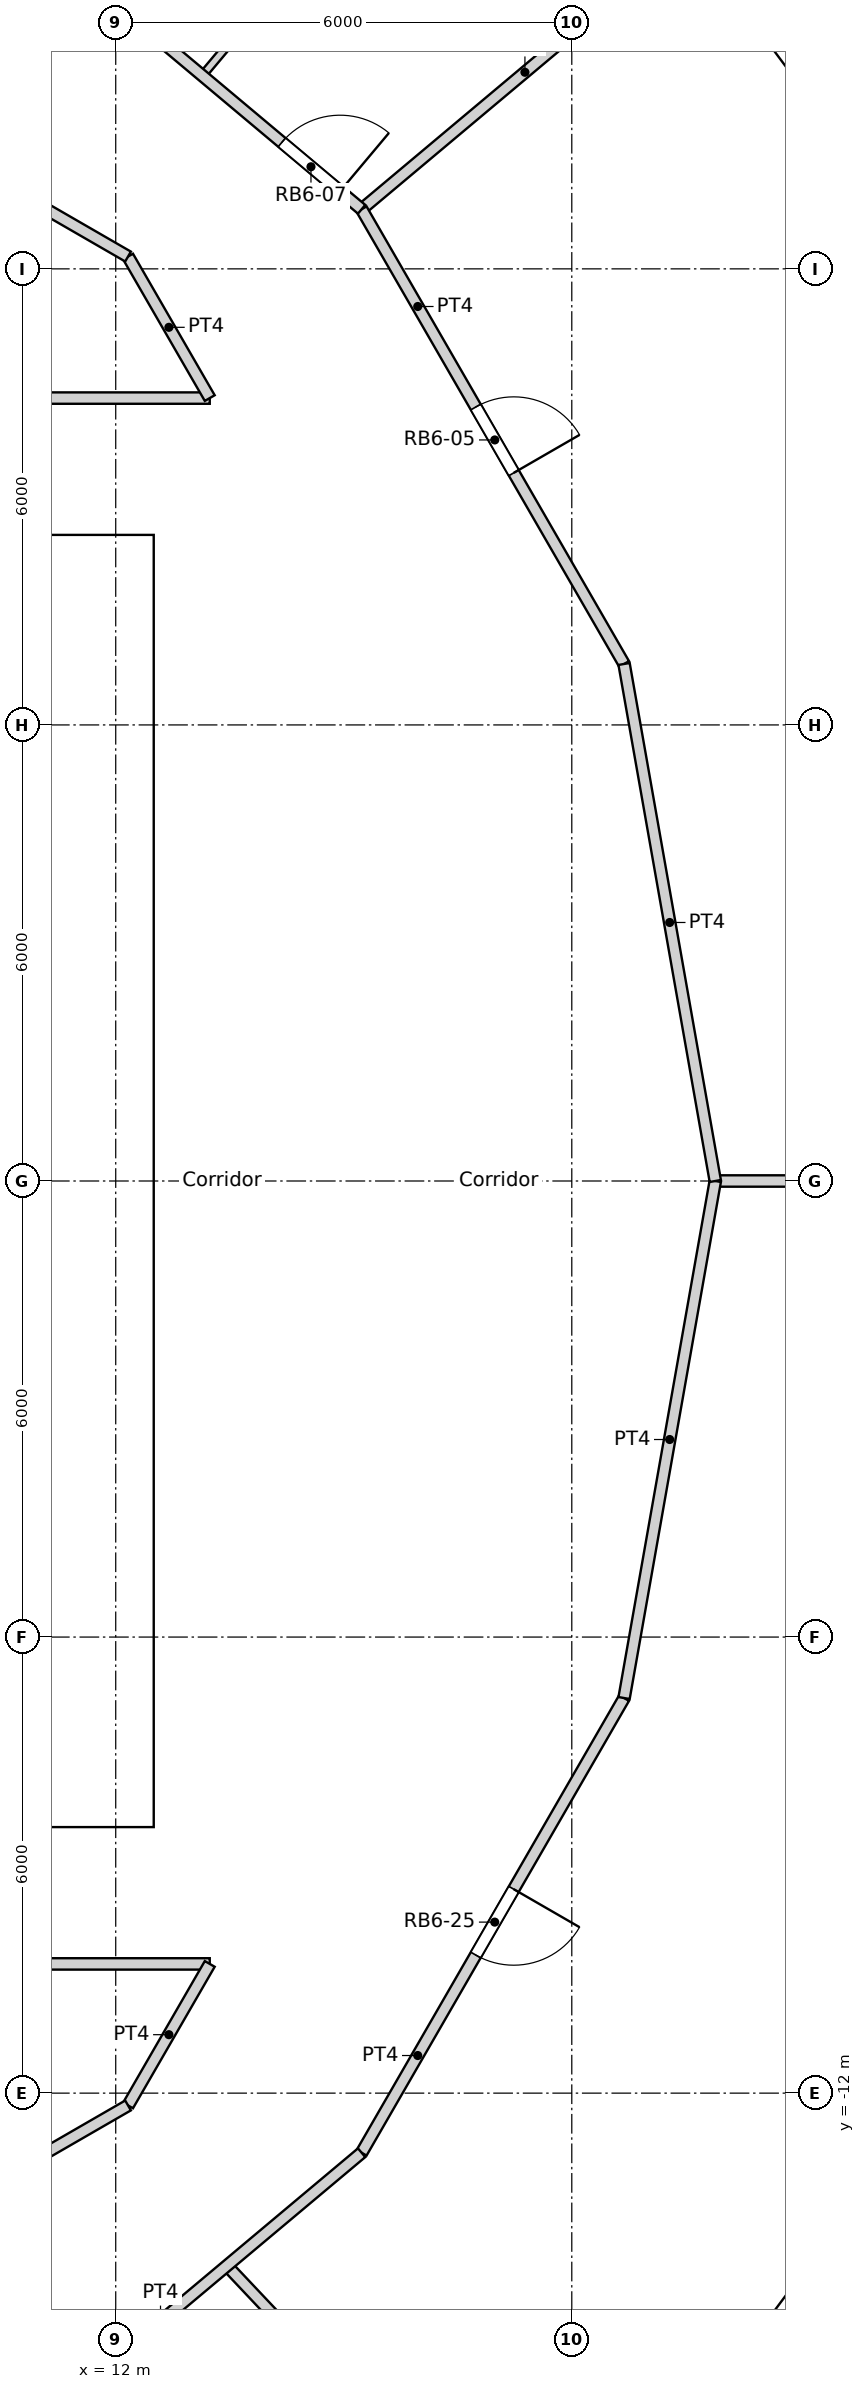
"""IFC4 building model, lengths in metres.
Left out: names, types, materials, properties, quantities, classifications, styles, units other than length and angle.
Written with IfcOpenShell. Run it as: python <this file> out.ifc"""

import sys

from ifc_helpers import new_model, si_unit, direction, frame, frame_2d, origin, origin_2d, place, context, subcontext, project, spatial, rectangle, circle, extrude, element, fill, save


model = new_model("IFC4")
c1 = context("Model", 3, precision=1e-05, world=origin(), true_north=direction((0.0, 1.0)))
c2 = subcontext(c1, "Body", "Model", "MODEL_VIEW")
j1 = project(units=[si_unit("LENGTHUNIT", "METRE"), si_unit("PLANEANGLEUNIT", "RADIAN")], contexts=[c1])
p1 = place(None, origin())
s1 = spatial("IfcSite", under=j1, at=p1, CompositionType="ELEMENT")
p2 = place(p1, origin())
s2 = spatial("IfcBuilding", under=s1, at=p2, CompositionType="ELEMENT")
p3 = place(p2, frame((0.0, 0.0, 180.0)))
s3 = spatial("IfcBuildingStorey", under=s2, at=p3, CompositionType="ELEMENT", Elevation=180.0)
for number, where, z_axis, x_axis in (
    (1, (18.822, 0.0, 0.0), (0.0, 0.0, 1.0), (1.0, 0.0, 0.0)),
    (2, (17.986, 5.548, 0.0), (0.0, 0.0, 1.0), (1.0, 0.0, 0.0)),
    (3, (15.552, 10.603, 0.0), (0.0, 0.0, 1.0), (1.0, 0.0, 0.0)),
    (4, (11.735, 14.716, 0.0), (0.0, 0.0, 1.0), (1.0, 0.0, 0.0)),
    (5, (11.735, -14.716, 0.0), (0.0, 0.0, 1.0), (1.0, 0.0, 0.0)),
    (6, (15.552, -10.603, 0.0), (0.0, 0.0, 1.0), (1.0, 0.0, 0.0)),
    (7, (17.986, -5.548, 0.0), (0.0, 0.0, 1.0), (1.0, 0.0, 0.0)),
):
    element("IfcColumn", number, at=place(p3, frame(where, z_axis=z_axis, x_axis=x_axis)), inside=s3, PredefinedType="COLUMN", context=c2, shape_type="SweptSolid", body=[
        extrude(circle(Radius=0.65, at=origin_2d()), origin(), (0.0, 0.0, 1.0), 3.6),
    ])
p4 = place(p3, frame((21.895, 14.43, -0.3), z_axis=(0.0, 0.0, 1.0), x_axis=(-0.597183717734, 0.802104486506, 0.0)))
e8 = element("IfcWall", 8, at=p4, inside=s3, PredefinedType="ELEMENTEDWALL", context=c2, shape_type="SweptSolid", body=[
    extrude(rectangle(XDim=3.0, YDim=1.45, at=frame_2d((1.5, 0.0))), origin(), (0.0, 0.0, 1.0), 3.6),
])
p5 = place(p4, frame((1.5, 0.0, 1.85)))
e9 = element("IfcOpeningElement", 9, at=p5, cuts=e8, PredefinedType="OPENING", context=c2, shape_type="SweptSolid", body=[
    extrude(circle(Radius=0.9, at=origin_2d()), frame((0.0, 0.735, 0.0), z_axis=(0.0, -1.0, 0.0), x_axis=(1.0, 0.0, 0.0)), (0.0, 0.0, 1.0), 1.47),
])
p6 = place(p3, frame((19.653, -16.478, 0.0), z_axis=(0.0, 0.0, 1.0), x_axis=(0.597197580538, 0.80209416517, 0.0)))
e10 = element("IfcWall", 10, at=p6, inside=s3, PredefinedType="SOLIDWALL", context=c2, shape_type="SweptSolid", body=[
    extrude(rectangle(XDim=2.973, YDim=0.3, at=frame_2d((1.486, 0.0))), origin(), (0.0, 0.0, 1.0), 3.3),
])
p7 = place(p6, frame((1.486, 0.0, 1.55)))
e11 = element("IfcOpeningElement", 11, at=p7, cuts=e10, PredefinedType="OPENING", context=c2, shape_type="SweptSolid", body=[
    extrude(circle(Radius=0.9, at=origin_2d()), frame((0.0, 0.16, 0.0), z_axis=(0.0, -1.0, 0.0), x_axis=(1.0, 0.0, 0.0)), (0.0, 0.0, 1.0), 0.32),
])
p8 = place(p3, frame((-12.5, -8.05, 0.0), z_axis=(0.0, 0.0, 1.0), x_axis=(1.0, 0.0, 0.0)))
e12 = element("IfcWall", 12, at=p8, inside=s3, PredefinedType="SOLIDWALL", context=c2, shape_type="SweptSolid", body=[
    extrude(rectangle(XDim=25.0, YDim=0.9, at=frame_2d((12.5, 0.0))), origin(), (0.0, 0.0, 1.0), 3.6),
])
p9 = place(p8, frame((13.4, 0.0, 0.0)))
e13 = element("IfcOpeningElement", 13, at=p9, cuts=e12, PredefinedType="OPENING", context=c2, shape_type="SweptSolid", body=[
    extrude(rectangle(XDim=1.0, YDim=2.1, at=frame_2d((0.5, 1.05))), frame((0.0, 0.45, 0.0), z_axis=(0.0, -1.0, 0.0), x_axis=(1.0, 0.0, 0.0)), (0.0, 0.0, 1.0), 0.9),
])
p10 = place(p8, frame((8.3, 0.0, 0.0)))
e14 = element("IfcOpeningElement", 14, at=p10, cuts=e12, PredefinedType="OPENING", context=c2, shape_type="SweptSolid", body=[
    extrude(rectangle(XDim=1.8, YDim=2.1, at=frame_2d((0.9, 1.05))), frame((0.0, 0.45, 0.0), z_axis=(0.0, -1.0, 0.0), x_axis=(1.0, 0.0, 0.0)), (0.0, 0.0, 1.0), 0.9),
])
p11 = place(p8, frame((14.9, 0.0, 0.0)))
e15 = element("IfcOpeningElement", 15, at=p11, cuts=e12, PredefinedType="OPENING", context=c2, shape_type="SweptSolid", body=[
    extrude(rectangle(XDim=1.8, YDim=2.1, at=frame_2d((0.9, 1.05))), frame((0.0, 0.45, 0.0), z_axis=(0.0, -1.0, 0.0), x_axis=(1.0, 0.0, 0.0)), (0.0, 0.0, 1.0), 0.9),
])
p12 = place(p3, frame((-12.5, 8.05, 0.0), z_axis=(0.0, 0.0, 1.0), x_axis=(1.0, 0.0, 0.0)))
e16 = element("IfcWall", 16, at=p12, inside=s3, PredefinedType="SOLIDWALL", context=c2, shape_type="SweptSolid", body=[
    extrude(rectangle(XDim=25.0, YDim=0.9, at=frame_2d((12.5, 0.0))), origin(), (0.0, 0.0, 1.0), 3.6),
])
p13 = place(p12, frame((8.3, 0.0, 0.0)))
e17 = element("IfcOpeningElement", 17, at=p13, cuts=e16, PredefinedType="OPENING", context=c2, shape_type="SweptSolid", body=[
    extrude(rectangle(XDim=1.8, YDim=2.1, at=frame_2d((0.9, 1.05))), frame((0.0, 0.45, 0.0), z_axis=(0.0, -1.0, 0.0), x_axis=(1.0, 0.0, 0.0)), (0.0, 0.0, 1.0), 0.9),
])
p14 = place(p3, frame((12.05, -7.6, 0.0), z_axis=(0.0, 0.0, 1.0), x_axis=(0.0, 1.0, 0.0)))
e18 = element("IfcWall", 18, at=p14, inside=s3, PredefinedType="SOLIDWALL", context=c2, shape_type="SweptSolid", body=[
    extrude(rectangle(XDim=15.2, YDim=0.9, at=frame_2d((7.6, 0.0))), origin(), (0.0, 0.0, 1.0), 3.6),
])
p15 = place(p14, frame((5.1, 0.0, 0.0)))
e19 = element("IfcOpeningElement", 19, at=p15, cuts=e18, PredefinedType="OPENING", context=c2, shape_type="SweptSolid", body=[
    extrude(rectangle(XDim=1.0, YDim=2.1, at=frame_2d((0.5, 1.05))), frame((0.0, 0.45, 0.0), z_axis=(0.0, -1.0, 0.0), x_axis=(1.0, 0.0, 0.0)), (0.0, 0.0, 1.0), 0.9),
])
p16 = place(p3, frame((9.2, -4.55, 0.0), z_axis=(0.0, 0.0, 1.0), x_axis=(1.0, 0.0, 0.0)))
e20 = element("IfcWall", 20, at=p16, inside=s3, PredefinedType="SOLIDWALL", context=c2, shape_type="SweptSolid", body=[
    extrude(rectangle(XDim=2.4, YDim=0.3, at=frame_2d((1.2, 0.0))), origin(), (0.0, 0.0, 1.0), 3.3),
])
p17 = place(p16, frame((0.65, 0.0, 0.0)))
e21 = element("IfcOpeningElement", 21, at=p17, cuts=e20, PredefinedType="OPENING", context=c2, shape_type="SweptSolid", body=[
    extrude(rectangle(XDim=1.1, YDim=2.1, at=frame_2d((0.55, 1.05))), frame((0.0, 0.15, 0.0), z_axis=(0.0, -1.0, 0.0), x_axis=(1.0, 0.0, 0.0)), (0.0, 0.0, 1.0), 0.3),
])
p18 = place(p3, frame((9.2, 4.55, 0.0), z_axis=(0.0, 0.0, 1.0), x_axis=(1.0, 0.0, 0.0)))
e22 = element("IfcWall", 22, at=p18, inside=s3, PredefinedType="SOLIDWALL", context=c2, shape_type="SweptSolid", body=[
    extrude(rectangle(XDim=2.4, YDim=0.3, at=frame_2d((1.2, 0.0))), origin(), (0.0, 0.0, 1.0), 3.3),
])
p19 = place(p18, frame((0.65, 0.0, 0.0)))
e23 = element("IfcOpeningElement", 23, at=p19, cuts=e22, PredefinedType="OPENING", context=c2, shape_type="SweptSolid", body=[
    extrude(rectangle(XDim=1.1, YDim=2.1, at=frame_2d((0.55, 1.05))), frame((0.0, 0.15, 0.0), z_axis=(0.0, -1.0, 0.0), x_axis=(1.0, 0.0, 0.0)), (0.0, 0.0, 1.0), 0.3),
])
p20 = place(p3, frame((-3.025, 10.3, 0.0), z_axis=(0.0, 0.0, 1.0), x_axis=(1.0, 0.0, 0.0)))
e24 = element("IfcWall", 24, at=p20, inside=s3, PredefinedType="PARTITIONING", context=c2, shape_type="SweptSolid", body=[
    extrude(rectangle(XDim=16.262, YDim=0.15, at=frame_2d((8.131, 0.0))), origin(), (0.0, 0.0, 1.0), 3.3),
])
p21 = place(p20, frame((7.263, 0.0, 0.0)))
e25 = element("IfcOpeningElement", 25, at=p21, cuts=e24, PredefinedType="OPENING", context=c2, shape_type="SweptSolid", body=[
    extrude(rectangle(XDim=1.0, YDim=2.04, at=frame_2d((0.5, 1.02))), frame((0.0, 0.075, 0.0), z_axis=(0.0, -1.0, 0.0), x_axis=(1.0, 0.0, 0.0)), (0.0, 0.0, 1.0), 0.15),
])
p22 = place(p3, frame((-3.025, -10.3, 0.0), z_axis=(0.0, 0.0, 1.0), x_axis=(1.0, 0.0, 0.0)))
e26 = element("IfcWall", 26, at=p22, inside=s3, PredefinedType="PARTITIONING", context=c2, shape_type="SweptSolid", body=[
    extrude(rectangle(XDim=16.262, YDim=0.15, at=frame_2d((8.131, 0.0))), origin(), (0.0, 0.0, 1.0), 3.3),
])
p23 = place(p22, frame((7.287, 0.0, 0.0)))
e27 = element("IfcOpeningElement", 27, at=p23, cuts=e26, PredefinedType="OPENING", context=c2, shape_type="SweptSolid", body=[
    extrude(rectangle(XDim=0.95, YDim=2.1, at=frame_2d((0.475, 1.05))), frame((0.0, 0.075, 0.0), z_axis=(0.0, -1.0, 0.0), x_axis=(1.0, 0.0, 0.0)), (0.0, 0.0, 1.0), 0.15),
])
for number, where, z_axis, x_axis in (
    (28, (12.162, 12.162, 0.0), (0.0, 0.0, 1.0), (0.5, -0.866, 0.0)),
    (29, (12.162, -12.162, 0.0), (0.0, 0.0, 1.0), (0.5, 0.866, 0.0)),
):
    element("IfcWall", number, at=place(p3, frame(where, z_axis=z_axis, x_axis=x_axis)), inside=s3, PredefinedType="PARTITIONING", context=c2, shape_type="SweptSolid", body=[
        extrude(rectangle(XDim=2.15, YDim=0.15, at=frame_2d((1.075, 0.0))), origin(), (0.0, 0.0, 1.0), 3.3),
    ])
p24 = place(p3, frame((15.235, 12.784, 0.0), z_axis=(0.0, 0.0, 1.0), x_axis=(0.499914202267, -0.866074933462, 0.0)))
e30 = element("IfcWall", 30, at=p24, inside=s3, PredefinedType="PARTITIONING", context=c2, shape_type="SweptSolid", body=[
    extrude(rectangle(XDim=6.907, YDim=0.15, at=frame_2d((3.454, 0.0))), origin(), (0.0, 0.0, 1.0), 3.3),
])
p25 = place(p24, frame((3.004, 0.0, 0.0)))
e31 = element("IfcOpeningElement", 31, at=p25, cuts=e30, PredefinedType="OPENING", context=c2, shape_type="SweptSolid", body=[
    extrude(rectangle(XDim=1.0, YDim=2.04, at=frame_2d((0.5, 1.02))), frame((0.0, 0.075, 0.0), z_axis=(0.0, -1.0, 0.0), x_axis=(1.0, 0.0, 0.0)), (0.0, 0.0, 1.0), 0.15),
])
p26 = place(p3, frame((18.688, 6.802, 0.0), z_axis=(0.0, 0.0, 1.0), x_axis=(0.173728873845, -0.98479352069, 0.0)))
e32 = element("IfcWall", 32, at=p26, inside=s3, PredefinedType="PARTITIONING", context=c2, shape_type="SweptSolid", body=[
    extrude(rectangle(XDim=6.907, YDim=0.15, at=frame_2d((3.454, 0.0))), origin(), (0.0, 0.0, 1.0), 3.3),
])
p27 = place(p3, frame((9.943, 17.222, 0.0), z_axis=(0.0, 0.0, 1.0), x_axis=(0.766192104565, -0.642611592567, 0.0)))
e33 = element("IfcWall", 33, at=p27, inside=s3, PredefinedType="PARTITIONING", context=c2, shape_type="SweptSolid", body=[
    extrude(rectangle(XDim=6.906, YDim=0.15, at=frame_2d((3.453, 0.0))), origin(), (0.0, 0.0, 1.0), 3.3),
])
p28 = place(p27, frame((5.537, 0.0, 0.0)))
e34 = element("IfcOpeningElement", 34, at=p28, cuts=e33, PredefinedType="OPENING", context=c2, shape_type="SweptSolid", body=[
    extrude(rectangle(XDim=1.0, YDim=2.1, at=frame_2d((0.5, 1.05))), frame((0.0, 0.075, 0.0), z_axis=(0.0, -1.0, 0.0), x_axis=(1.0, 0.0, 0.0)), (0.0, 0.0, 1.0), 0.15),
])
p29 = place(p3, frame((18.688, -6.802, 0.0), z_axis=(0.0, 0.0, 1.0), x_axis=(0.173728873845, 0.98479352069, 0.0)))
e35 = element("IfcWall", 35, at=p29, inside=s3, PredefinedType="PARTITIONING", context=c2, shape_type="SweptSolid", body=[
    extrude(rectangle(XDim=6.907, YDim=0.15, at=frame_2d((3.454, 0.0))), origin(), (0.0, 0.0, 1.0), 3.3),
])
p30 = place(p3, frame((15.235, -12.784, 0.0), z_axis=(0.0, 0.0, 1.0), x_axis=(0.499914202267, 0.866074933462, 0.0)))
e36 = element("IfcWall", 36, at=p30, inside=s3, PredefinedType="PARTITIONING", context=c2, shape_type="SweptSolid", body=[
    extrude(rectangle(XDim=6.907, YDim=0.15, at=frame_2d((3.454, 0.0))), origin(), (0.0, 0.0, 1.0), 3.3),
])
p31 = place(p30, frame((3.003, 0.0, 0.0)))
e37 = element("IfcOpeningElement", 37, at=p31, cuts=e36, PredefinedType="OPENING", context=c2, shape_type="SweptSolid", body=[
    extrude(rectangle(XDim=1.0, YDim=2.04, at=frame_2d((0.5, 1.02))), frame((0.0, 0.075, 0.0), z_axis=(0.0, -1.0, 0.0), x_axis=(1.0, 0.0, 0.0)), (0.0, 0.0, 1.0), 0.15),
])
p32 = place(p3, frame((9.943, -17.222, 0.0), z_axis=(0.0, 0.0, 1.0), x_axis=(0.766192104565, 0.642611592567, 0.0)))
e38 = element("IfcWall", 38, at=p32, inside=s3, PredefinedType="PARTITIONING", context=c2, shape_type="SweptSolid", body=[
    extrude(rectangle(XDim=6.906, YDim=0.15, at=frame_2d((3.453, 0.0))), origin(), (0.0, 0.0, 1.0), 3.3),
])
for number, where, z_axis, x_axis in (
    (39, (4.452, 16.614, 0.0), (0.0, 0.0, 1.0), (0.866, -0.5, 0.0)),
    (40, (4.452, -16.614, 0.0), (0.0, 0.0, 1.0), (0.866, 0.5, 0.0)),
):
    element("IfcWall", number, at=place(p3, frame(where, z_axis=z_axis, x_axis=x_axis)), inside=s3, PredefinedType="PARTITIONING", context=c2, shape_type="SweptSolid", body=[
        extrude(rectangle(XDim=8.903, YDim=0.15, at=frame_2d((4.452, 0.0))), origin(), (0.0, 0.0, 1.0), 3.3),
    ])
p33 = place(p3, frame((15.235, 12.784, 0.0), z_axis=(0.0, 0.0, 1.0), x_axis=(0.76609059793, 0.642732600514, 0.0)))
e41 = element("IfcWall", 41, at=p33, inside=s3, PredefinedType="PARTITIONING", context=c2, shape_type="SweptSolid", body=[
    extrude(rectangle(XDim=5.609, YDim=0.15, at=frame_2d((2.804, 0.0))), origin(), (0.0, 0.0, 1.0), 3.3),
])
p34 = place(p3, frame((19.888, 0.0, 0.0), z_axis=(0.0, 0.0, 1.0), x_axis=(1.0, 0.0, 0.0)))
e42 = element("IfcWall", 42, at=p34, inside=s3, PredefinedType="PARTITIONING", context=c2, shape_type="SweptSolid", body=[
    extrude(rectangle(XDim=5.609, YDim=0.15, at=frame_2d((2.805, 0.0))), origin(), (0.0, 0.0, 1.0), 3.3),
])
p35 = place(p3, frame((13.139, 14.542, 0.0), z_axis=(0.0, 0.0, 1.0), x_axis=(0.642731657745, 0.766091388891, 0.0)))
e43 = element("IfcWall", 43, at=p35, inside=s3, PredefinedType="PARTITIONING", context=c2, shape_type="SweptSolid", body=[
    extrude(rectangle(XDim=2.401, YDim=0.1, at=frame_2d((1.2, 0.0))), origin(), (0.0, 0.0, 1.0), 3.3),
])
p36 = place(p35, frame((0.75, 0.0, 0.0)))
e44 = element("IfcOpeningElement", 44, at=p36, cuts=e43, PredefinedType="OPENING", context=c2, shape_type="SweptSolid", body=[
    extrude(rectangle(XDim=0.9, YDim=2.04, at=frame_2d((0.45, 1.02))), frame((0.0, 0.05, 0.0), z_axis=(0.0, -1.0, 0.0), x_axis=(1.0, 0.0, 0.0)), (0.0, 0.0, 1.0), 0.1),
])
p37 = place(p3, frame((13.463, -14.27, 0.0), z_axis=(0.0, 0.0, 1.0), x_axis=(0.6862502776, -0.72736549031, 0.0)))
e45 = element("IfcWall", 45, at=p37, inside=s3, PredefinedType="PARTITIONING", context=c2, shape_type="SweptSolid", body=[
    extrude(rectangle(XDim=5.879, YDim=0.15, at=frame_2d((2.939, 0.0))), origin(), (0.0, 0.0, 1.0), 3.3),
])
p38 = place(p5, origin())
e46 = element("IfcWindow", 46, at=p38, inside=s3, PartitioningType="SINGLE_PANEL", PredefinedType="WINDOW", context=c2, shape_type="SweptSolid", body=[
    extrude(circle(Radius=0.9, at=origin_2d()), frame((0.0, 0.695, 0.0), z_axis=(0.0, -1.0, 0.0), x_axis=(1.0, 0.0, 0.0)), (0.0, 0.0, 1.0), 0.1),
])
fill(e9, e46)
p39 = place(p7, origin())
e47 = element("IfcWindow", 47, at=p39, inside=s3, PartitioningType="SINGLE_PANEL", PredefinedType="WINDOW", context=c2, shape_type="SweptSolid", body=[
    extrude(circle(Radius=0.9, at=origin_2d()), frame((0.0, 0.12, 0.0), z_axis=(0.0, -1.0, 0.0), x_axis=(1.0, 0.0, 0.0)), (0.0, 0.0, 1.0), 0.1),
])
fill(e11, e47)
p40 = place(p15, origin())
e48 = element("IfcDoor", 48, at=p40, inside=s3, OperationType="DOUBLE_DOOR_SINGLE_SWING", PredefinedType="DOOR", context=c2, shape_type="SweptSolid", body=[
    extrude(rectangle(XDim=1.0, YDim=2.1, at=frame_2d((0.5, 1.05))), frame((0.0, 0.025, 0.0), z_axis=(0.0, -1.0, 0.0), x_axis=(1.0, 0.0, 0.0)), (0.0, 0.0, 1.0), 0.05),
])
fill(e19, e48)
p41 = place(p25, origin())
e49 = element("IfcDoor", 49, at=p41, inside=s3, OperationType="SINGLE_SWING_RIGHT", PredefinedType="DOOR", context=c2, shape_type="SweptSolid", body=[
    extrude(rectangle(XDim=1.0, YDim=2.04, at=frame_2d((0.5, 1.02))), frame((0.0, 0.025, 0.0), z_axis=(0.0, -1.0, 0.0), x_axis=(1.0, 0.0, 0.0)), (0.0, 0.0, 1.0), 0.05),
])
fill(e31, e49)
p42 = place(p28, origin())
e50 = element("IfcDoor", 50, at=p42, inside=s3, OperationType="SINGLE_SWING_RIGHT", PredefinedType="DOOR", context=c2, shape_type="SweptSolid", body=[
    extrude(rectangle(XDim=1.0, YDim=2.1, at=frame_2d((0.5, 1.05))), frame((0.0, 0.025, 0.0), z_axis=(0.0, -1.0, 0.0), x_axis=(1.0, 0.0, 0.0)), (0.0, 0.0, 1.0), 0.05),
])
fill(e34, e50)
p43 = place(p31, origin())
e51 = element("IfcDoor", 51, at=p43, inside=s3, OperationType="SINGLE_SWING_LEFT", PredefinedType="DOOR", context=c2, shape_type="SweptSolid", body=[
    extrude(rectangle(XDim=1.0, YDim=2.04, at=frame_2d((0.5, 1.02))), frame((0.0, 0.025, 0.0), z_axis=(0.0, -1.0, 0.0), x_axis=(1.0, 0.0, 0.0)), (0.0, 0.0, 1.0), 0.05),
])
fill(e37, e51)
save(model, sys.argv[1])
